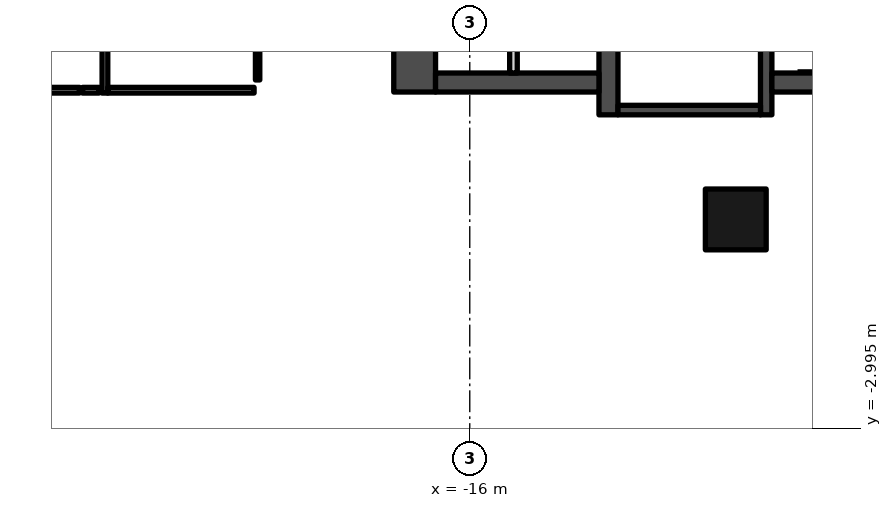
"""IFC4 building model, lengths in metres.
Left out: names, types, materials, properties, quantities, classifications, styles, units other than length and angle.
Written with IfcOpenShell. Run it as: python <this file> out.ifc"""

import sys

from ifc_helpers import new_model, si_unit, direction, frame, frame_2d, origin, origin_2d, place, context, subcontext, project, spatial, rectangle, extrude, element, fill, save


model = new_model("IFC4")
c1 = context("Model", 3, precision=1e-05, world=origin(), true_north=direction((0.0, 1.0)))
c2 = subcontext(c1, "Body", "Model", "MODEL_VIEW")
j1 = project(units=[si_unit("LENGTHUNIT", "METRE"), si_unit("PLANEANGLEUNIT", "RADIAN")], contexts=[c1])
p1 = place(None, origin())
s1 = spatial("IfcSite", under=j1, at=p1, CompositionType="ELEMENT")
p2 = place(p1, origin())
s2 = spatial("IfcBuilding", under=s1, at=p2, CompositionType="ELEMENT")
p3 = place(p2, origin())
s3 = spatial("IfcBuildingStorey", under=s2, at=p3, CompositionType="ELEMENT", Elevation=0.0)
p4 = place(p3, frame((-9.0, 2.5, 0.0), z_axis=(0.0, 0.0, 1.0), x_axis=(1.0, 0.0, 0.0)))
e1 = element("IfcColumn", 1, at=p4, inside=s3, PredefinedType="COLUMN", context=c2, shape_type="SweptSolid", body=[
    extrude(rectangle(XDim=1.6, YDim=1.6, at=origin_2d()), origin(), (0.0, 0.0, 1.0), 9.0),
])
p5 = place(p3, frame((-12.35, 5.253, 0.0), z_axis=(0.0, 0.0, 1.0), x_axis=(0.0, 1.0, 0.0)))
e2 = element("IfcWall", 2, at=p5, inside=s3, PredefinedType="SHEAR", context=c2, shape_type="SweptSolid", body=[
    extrude(rectangle(XDim=13.3, YDim=0.5, at=frame_2d((6.65, 0.0))), origin(), (0.0, 0.0, 1.0), 9.0),
])
p6 = place(p3, frame((-8.2, 5.253, 0.0), z_axis=(0.0, 0.0, 1.0), x_axis=(0.0, 1.0, 0.0)))
e3 = element("IfcWall", 3, at=p6, inside=s3, PredefinedType="SHEAR", context=c2, shape_type="SweptSolid", body=[
    extrude(rectangle(XDim=13.3, YDim=0.3, at=frame_2d((6.65, 0.0))), origin(), (0.0, 0.0, 1.0), 9.0),
])
p7 = place(p6, frame((7.1, 0.0, 0.0)))
e4 = element("IfcOpeningElement", 4, at=p7, cuts=e3, PredefinedType="OPENING", context=c2, shape_type="SweptSolid", body=[
    extrude(rectangle(XDim=1.4, YDim=2.1, at=frame_2d((0.7, 1.05))), frame((0.0, 0.16, 0.0), z_axis=(0.0, -1.0, 0.0), x_axis=(1.0, 0.0, 0.0)), (0.0, 0.0, 1.0), 0.32),
])
p8 = place(p6, frame((5.05, 0.0, 0.0)))
e5 = element("IfcOpeningElement", 5, at=p8, cuts=e3, PredefinedType="OPENING", context=c2, shape_type="SweptSolid", body=[
    extrude(rectangle(XDim=1.4, YDim=2.1, at=frame_2d((0.7, 1.05))), frame((0.0, 0.16, 0.0), z_axis=(0.0, -1.0, 0.0), x_axis=(1.0, 0.0, 0.0)), (0.0, 0.0, 1.0), 0.32),
])
p9 = place(p3, frame((-12.1, 5.378, 0.0), z_axis=(0.0, 0.0, 1.0), x_axis=(1.0, 0.0, 0.0)))
e6 = element("IfcWall", 6, at=p9, inside=s3, PredefinedType="SHEAR", context=c2, shape_type="SweptSolid", body=[
    extrude(rectangle(XDim=3.75, YDim=0.25, at=frame_2d((1.875, 0.0))), origin(), (0.0, 0.0, 1.0), 9.0),
])
p10 = place(p3, frame((-8.05, 6.103, 0.0), z_axis=(0.0, 0.0, 1.0), x_axis=(1.0, 0.0, 0.0)))
e7 = element("IfcWall", 7, at=p10, inside=s3, PredefinedType="SHEAR", context=c2, shape_type="SweptSolid", body=[
    extrude(rectangle(XDim=7.05, YDim=0.5, at=frame_2d((3.525, 0.0))), origin(), (0.0, 0.0, 1.0), 9.0),
])
p11 = place(p10, frame((0.825, 0.0, 0.0)))
e8 = element("IfcOpeningElement", 8, at=p11, cuts=e7, PredefinedType="OPENING", context=c2, shape_type="SweptSolid", body=[
    extrude(rectangle(XDim=0.9, YDim=2.1, at=frame_2d((0.45, 1.05))), frame((0.0, 0.26, 0.0), z_axis=(0.0, -1.0, 0.0), x_axis=(1.0, 0.0, 0.0)), (0.0, 0.0, 1.0), 0.52),
])
p12 = place(p3, frame((-12.6, 6.103, 0.0), z_axis=(0.0, 0.0, 1.0), x_axis=(-1.0, 0.0, 0.0)))
e9 = element("IfcWall", 9, at=p12, inside=s3, PredefinedType="SHEAR", context=c2, shape_type="SweptSolid", body=[
    extrude(rectangle(XDim=4.3, YDim=0.5, at=frame_2d((2.15, 0.0))), origin(), (0.0, 0.0, 1.0), 9.0),
])
p13 = place(p3, frame((-17.45, 5.853, 0.0), z_axis=(0.0, 0.0, 1.0), x_axis=(0.0, 1.0, 0.0)))
e10 = element("IfcWall", 10, at=p13, inside=s3, PredefinedType="SHEAR", context=c2, shape_type="SweptSolid", body=[
    extrude(rectangle(XDim=13.2, YDim=1.1, at=frame_2d((6.6, 0.0))), origin(), (0.0, 0.0, 1.0), 9.0),
])
p14 = place(p13, frame((4.1, 0.0, 0.0)))
e11 = element("IfcOpeningElement", 11, at=p14, cuts=e10, PredefinedType="OPENING", context=c2, shape_type="SweptSolid", body=[
    extrude(rectangle(XDim=1.6, YDim=2.1, at=frame_2d((0.8, 1.05))), frame((0.0, 0.56, 0.0), z_axis=(0.0, -1.0, 0.0), x_axis=(1.0, 0.0, 0.0)), (0.0, 0.0, 1.0), 1.12),
])
p15 = place(p13, frame((9.75, 0.0, 0.0)))
e12 = element("IfcOpeningElement", 12, at=p15, cuts=e10, PredefinedType="OPENING", context=c2, shape_type="SweptSolid", body=[
    extrude(rectangle(XDim=0.9, YDim=2.1, at=frame_2d((0.45, 1.05))), frame((0.0, 0.56, 0.0), z_axis=(0.0, -1.0, 0.0), x_axis=(1.0, 0.0, 0.0)), (0.0, 0.0, 1.0), 1.12),
])
p16 = place(p3, frame((-14.85, 6.353, 0.0), z_axis=(0.0, 0.0, 1.0), x_axis=(0.0, 1.0, 0.0)))
e13 = element("IfcWall", 13, at=p16, inside=s3, PredefinedType="SOLIDWALL", context=c2, shape_type="SweptSolid", body=[
    extrude(rectangle(XDim=2.5, YDim=0.2, at=frame_2d((1.25, 0.0))), origin(), (0.0, 0.0, 1.0), 8.5),
])
p17 = place(p3, frame((-29.525, 5.9, 0.0), z_axis=(0.0, 0.0, 1.0), x_axis=(1.0, 0.0, 0.0)))
e14 = element("IfcWall", 14, at=p17, inside=s3, PredefinedType="PARTITIONING", context=c2, shape_type="SweptSolid", body=[
    extrude(rectangle(XDim=3.255, YDim=0.15, at=frame_2d((1.627, 0.0))), origin(), (0.0, 0.0, 1.0), 8.5),
])
p18 = place(p3, frame((-25.6, 5.825, 0.0), z_axis=(0.0, 0.0, 1.0), x_axis=(0.0, 1.0, 0.0)))
e15 = element("IfcWall", 15, at=p18, inside=s3, PredefinedType="PARTITIONING", context=c2, shape_type="SweptSolid", body=[
    extrude(rectangle(XDim=5.25, YDim=0.15, at=frame_2d((2.625, 0.0))), origin(), (0.0, 0.0, 1.0), 7.3),
])
p19 = place(p3, frame((-25.525, 5.9, 0.0), z_axis=(0.0, 0.0, 1.0), x_axis=(1.0, 0.0, 0.0)))
e16 = element("IfcWall", 16, at=p19, inside=s3, PredefinedType="PARTITIONING", context=c2, shape_type="SweptSolid", body=[
    extrude(rectangle(XDim=3.85, YDim=0.15, at=frame_2d((1.925, 0.0))), origin(), (0.0, 0.0, 1.0), 7.6),
])
p20 = place(p3, frame((-21.583, 6.17, 0.0), z_axis=(0.0, 0.0, 1.0), x_axis=(0.0, 1.0, 0.0)))
e17 = element("IfcWall", 17, at=p20, inside=s3, PredefinedType="PARTITIONING", context=c2, shape_type="SweptSolid", body=[
    extrude(rectangle(XDim=4.905, YDim=0.115, at=frame_2d((2.453, 0.0))), origin(), (0.0, 0.0, 1.0), 7.3),
])
p21 = place(p20, frame((1.83, 0.0, 0.0)))
e18 = element("IfcOpeningElement", 18, at=p21, cuts=e17, PredefinedType="OPENING", context=c2, shape_type="SweptSolid", body=[
    extrude(rectangle(XDim=0.9, YDim=2.1, at=frame_2d((0.45, 1.05))), frame((0.0, 0.067, 0.0), z_axis=(0.0, -1.0, 0.0), x_axis=(1.0, 0.0, 0.0)), (0.0, 0.0, 1.0), 0.135),
])
p22 = place(p3, frame((-26.19, 5.9, 0.0), z_axis=(0.0, 0.0, 1.0), x_axis=(1.0, 0.0, 0.0)))
e19 = element("IfcWall", 19, at=p22, inside=s3, PredefinedType="PARTITIONING", context=c2, shape_type="SweptSolid", body=[
    extrude(rectangle(XDim=0.435, YDim=0.15, at=frame_2d((0.218, 0.0))), origin(), (0.0, 0.0, 1.0), 8.5),
])
p23 = place(p11, origin())
e20 = element("IfcDoor", 20, at=p23, inside=s3, OperationType="SINGLE_SWING_LEFT", PredefinedType="DOOR", context=c2, shape_type="SweptSolid", body=[
    extrude(rectangle(XDim=0.9, YDim=2.1, at=frame_2d((0.45, 1.05))), frame((0.0, 0.025, 0.0), z_axis=(0.0, -1.0, 0.0), x_axis=(1.0, 0.0, 0.0)), (0.0, 0.0, 1.0), 0.05),
])
fill(e8, e20)
save(model, sys.argv[1])
